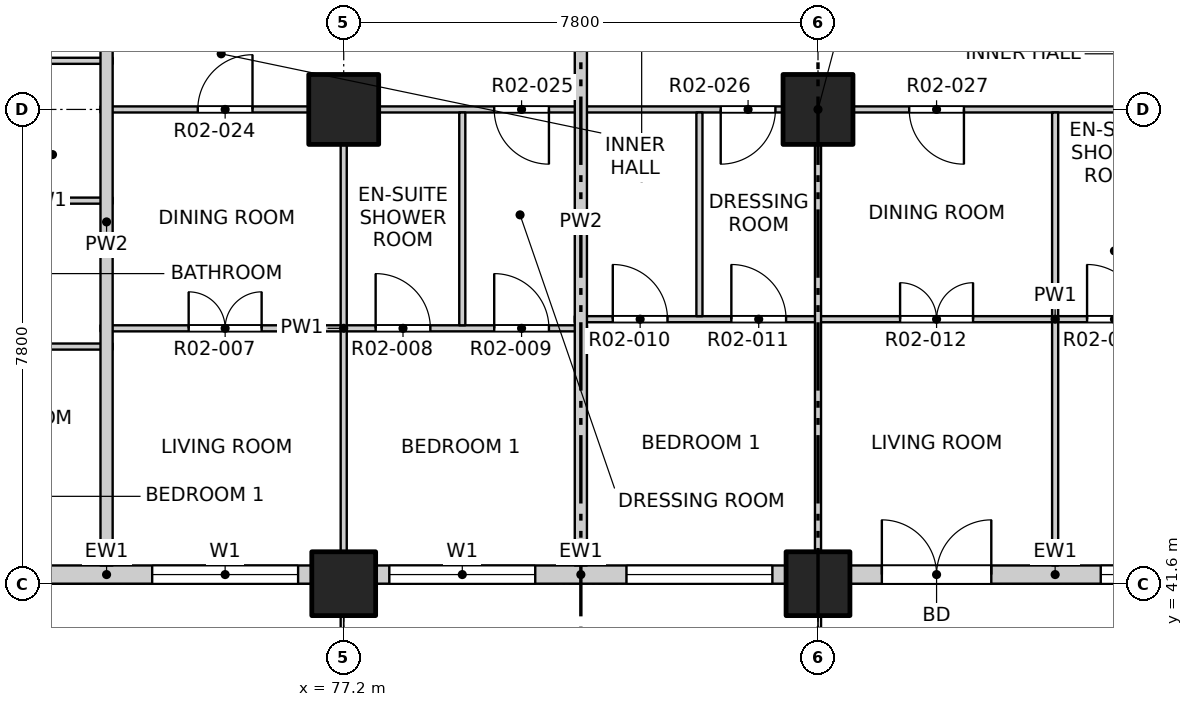
"""IFC4 building model, lengths in metres.
Left out: names, types, materials, properties, quantities, classifications, styles, units other than length and angle.
Written with IfcOpenShell. Run it as: python <this file> out.ifc"""

import sys

from ifc_helpers import new_model, si_unit, direction, frame, frame_2d, origin, origin_2d, place, context, subcontext, project, spatial, rectangle, extrude, element, fill, save


model = new_model("IFC4")
c1 = context("Model", 3, precision=1e-05, world=origin(), true_north=direction((0.0, 1.0)))
c2 = subcontext(c1, "Body", "Model", "MODEL_VIEW")
j1 = project(units=[si_unit("LENGTHUNIT", "METRE"), si_unit("PLANEANGLEUNIT", "RADIAN")], contexts=[c1])
p1 = place(None, origin())
s1 = spatial("IfcSite", under=j1, at=p1, CompositionType="ELEMENT")
p2 = place(p1, origin())
s2 = spatial("IfcBuilding", under=s1, at=p2, CompositionType="ELEMENT")
p3 = place(p2, frame((0.0, 0.0, 29.7)))
s3 = spatial("IfcBuildingStorey", under=s2, at=p3, CompositionType="ELEMENT", Elevation=29.7)
for number, where, z_axis, x_axis in (
    (1, (77.2, 41.6, -0.25), (0.0, 0.0, 1.0), (1.0, 0.0, 0.0)),
    (2, (85.0, 41.6, -0.25), (0.0, 0.0, 1.0), (1.0, 0.0, 0.0)),
):
    element("IfcColumn", number, at=place(p3, frame(where, z_axis=z_axis, x_axis=x_axis)), inside=s3, PredefinedType="COLUMN", context=c2, shape_type="SweptSolid", body=[
        extrude(rectangle(XDim=1.05, YDim=1.05, at=origin_2d()), origin(), (0.0, 0.0, 1.0), 3.4),
    ])
for number, where, z_axis, x_axis in (
    (3, (77.2, 49.4, -0.25), (0.0, 0.0, 1.0), (1.0, 0.0, 0.0)),
    (4, (85.0, 49.4, -0.25), (0.0, 0.0, 1.0), (1.0, 0.0, 0.0)),
):
    element("IfcColumn", number, at=place(p3, frame(where, z_axis=z_axis, x_axis=x_axis)), inside=s3, PredefinedType="COLUMN", context=c2, shape_type="SweptSolid", body=[
        extrude(rectangle(XDim=1.15, YDim=1.15, at=origin_2d()), origin(), (0.0, 0.0, 1.0), 3.4),
    ])
p4 = place(p3, frame((69.925, 41.75, 0.0), z_axis=(0.0, 0.0, 1.0), x_axis=(1.0, 0.0, 0.0)))
e5 = element("IfcWall", 5, at=p4, inside=s3, PredefinedType="SOLIDWALL", context=c2, shape_type="SweptSolid", body=[
    extrude(rectangle(XDim=6.75, YDim=0.3, at=frame_2d((3.375, 0.0))), origin(), (0.0, 0.0, 1.0), 2.7),
])
p5 = place(p4, frame((0.525, 0.0, 0.0)))
e6 = element("IfcOpeningElement", 6, at=p5, cuts=e5, PredefinedType="OPENING", context=c2, shape_type="SweptSolid", body=[
    extrude(rectangle(XDim=1.8, YDim=2.4, at=frame_2d((0.9, 1.2))), frame((0.0, 0.16, 0.0), z_axis=(0.0, -1.0, 0.0), x_axis=(1.0, 0.0, 0.0)), (0.0, 0.0, 1.0), 0.32),
])
p6 = place(p4, frame((4.125, 0.0, 0.9)))
e7 = element("IfcOpeningElement", 7, at=p6, cuts=e5, PredefinedType="OPENING", context=c2, shape_type="SweptSolid", body=[
    extrude(rectangle(XDim=2.4, YDim=1.8, at=frame_2d((1.2, 0.9))), frame((0.0, 0.16, 0.0), z_axis=(0.0, -1.0, 0.0), x_axis=(1.0, 0.0, 0.0)), (0.0, 0.0, 1.0), 0.32),
])
p7 = place(p3, frame((77.725, 41.75, 0.0), z_axis=(0.0, 0.0, 1.0), x_axis=(1.0, 0.0, 0.0)))
e8 = element("IfcWall", 8, at=p7, inside=s3, PredefinedType="SOLIDWALL", context=c2, shape_type="SweptSolid", body=[
    extrude(rectangle(XDim=6.75, YDim=0.3, at=frame_2d((3.375, 0.0))), origin(), (0.0, 0.0, 1.0), 2.7),
])
p8 = place(p7, frame((0.225, 0.0, 0.9)))
e9 = element("IfcOpeningElement", 9, at=p8, cuts=e8, PredefinedType="OPENING", context=c2, shape_type="SweptSolid", body=[
    extrude(rectangle(XDim=2.4, YDim=1.8, at=frame_2d((1.2, 0.9))), frame((0.0, 0.16, 0.0), z_axis=(0.0, -1.0, 0.0), x_axis=(1.0, 0.0, 0.0)), (0.0, 0.0, 1.0), 0.32),
])
p9 = place(p7, frame((4.125, 0.0, 0.9)))
e10 = element("IfcOpeningElement", 10, at=p9, cuts=e8, PredefinedType="OPENING", context=c2, shape_type="SweptSolid", body=[
    extrude(rectangle(XDim=2.4, YDim=1.8, at=frame_2d((1.2, 0.9))), frame((0.0, 0.16, 0.0), z_axis=(0.0, -1.0, 0.0), x_axis=(1.0, 0.0, 0.0)), (0.0, 0.0, 1.0), 0.32),
])
p10 = place(p3, frame((85.525, 41.75, 0.0), z_axis=(0.0, 0.0, 1.0), x_axis=(1.0, 0.0, 0.0)))
e11 = element("IfcWall", 11, at=p10, inside=s3, PredefinedType="SOLIDWALL", context=c2, shape_type="SweptSolid", body=[
    extrude(rectangle(XDim=6.75, YDim=0.3, at=frame_2d((3.375, 0.0))), origin(), (0.0, 0.0, 1.0), 2.7),
])
p11 = place(p10, frame((0.525, 0.0, 0.0)))
e12 = element("IfcOpeningElement", 12, at=p11, cuts=e11, PredefinedType="OPENING", context=c2, shape_type="SweptSolid", body=[
    extrude(rectangle(XDim=1.8, YDim=2.4, at=frame_2d((0.9, 1.2))), frame((0.0, 0.16, 0.0), z_axis=(0.0, -1.0, 0.0), x_axis=(1.0, 0.0, 0.0)), (0.0, 0.0, 1.0), 0.32),
])
p12 = place(p10, frame((4.125, 0.0, 0.9)))
e13 = element("IfcOpeningElement", 13, at=p12, cuts=e11, PredefinedType="OPENING", context=c2, shape_type="SweptSolid", body=[
    extrude(rectangle(XDim=2.4, YDim=1.8, at=frame_2d((1.2, 0.9))), frame((0.0, 0.16, 0.0), z_axis=(0.0, -1.0, 0.0), x_axis=(1.0, 0.0, 0.0)), (0.0, 0.0, 1.0), 0.32),
])
p13 = place(p3, frame((61.9, 45.5, 0.0), z_axis=(0.0, 0.0, 1.0), x_axis=(1.0, 0.0, 0.0)))
e14 = element("IfcWall", 14, at=p13, inside=s3, PredefinedType="PARTITIONING", context=c2, shape_type="SweptSolid", body=[
    extrude(rectangle(XDim=11.5, YDim=0.1, at=frame_2d((5.75, 0.0))), origin(), (0.0, 0.0, 1.0), 3.15),
])
p14 = place(p13, frame((7.965, 0.0, 0.0)))
e15 = element("IfcOpeningElement", 15, at=p14, cuts=e14, PredefinedType="OPENING", context=c2, shape_type="SweptSolid", body=[
    extrude(rectangle(XDim=0.9, YDim=2.1, at=frame_2d((0.45, 1.05))), frame((0.0, 0.06, 0.0), z_axis=(0.0, -1.0, 0.0), x_axis=(1.0, 0.0, 0.0)), (0.0, 0.0, 1.0), 0.12),
])
p15 = place(p3, frame((73.2, 45.8, 0.0), z_axis=(0.0, 0.0, 1.0), x_axis=(1.0, 0.0, 0.0)))
e16 = element("IfcWall", 16, at=p15, inside=s3, PredefinedType="PARTITIONING", context=c2, shape_type="SweptSolid", body=[
    extrude(rectangle(XDim=8.0, YDim=0.1, at=frame_2d((4.0, 0.0))), origin(), (0.0, 0.0, 1.0), 3.15),
])
p16 = place(p15, frame((1.45, 0.0, 0.0)))
e17 = element("IfcOpeningElement", 17, at=p16, cuts=e16, PredefinedType="OPENING", context=c2, shape_type="SweptSolid", body=[
    extrude(rectangle(XDim=1.2, YDim=2.1, at=frame_2d((0.6, 1.05))), frame((0.0, 0.06, 0.0), z_axis=(0.0, -1.0, 0.0), x_axis=(1.0, 0.0, 0.0)), (0.0, 0.0, 1.0), 0.12),
])
p17 = place(p15, frame((4.525, 0.0, 0.0)))
e18 = element("IfcOpeningElement", 18, at=p17, cuts=e16, PredefinedType="OPENING", context=c2, shape_type="SweptSolid", body=[
    extrude(rectangle(XDim=0.9, YDim=2.1, at=frame_2d((0.45, 1.05))), frame((0.0, 0.06, 0.0), z_axis=(0.0, -1.0, 0.0), x_axis=(1.0, 0.0, 0.0)), (0.0, 0.0, 1.0), 0.12),
])
p18 = place(p15, frame((6.475, 0.0, 0.0)))
e19 = element("IfcOpeningElement", 19, at=p18, cuts=e16, PredefinedType="OPENING", context=c2, shape_type="SweptSolid", body=[
    extrude(rectangle(XDim=0.9, YDim=2.1, at=frame_2d((0.45, 1.05))), frame((0.0, 0.06, 0.0), z_axis=(0.0, -1.0, 0.0), x_axis=(1.0, 0.0, 0.0)), (0.0, 0.0, 1.0), 0.12),
])
p19 = place(p3, frame((81.0, 45.95, 0.0), z_axis=(0.0, 0.0, 1.0), x_axis=(1.0, 0.0, 0.0)))
e20 = element("IfcWall", 20, at=p19, inside=s3, PredefinedType="PARTITIONING", context=c2, shape_type="SweptSolid", body=[
    extrude(rectangle(XDim=15.8, YDim=0.1, at=frame_2d((7.9, 0.0))), origin(), (0.0, 0.0, 1.0), 3.15),
])
p20 = place(p19, frame((0.625, 0.0, 0.0)))
e21 = element("IfcOpeningElement", 21, at=p20, cuts=e20, PredefinedType="OPENING", context=c2, shape_type="SweptSolid", body=[
    extrude(rectangle(XDim=0.9, YDim=2.1, at=frame_2d((0.45, 1.05))), frame((0.0, 0.06, 0.0), z_axis=(0.0, -1.0, 0.0), x_axis=(1.0, 0.0, 0.0)), (0.0, 0.0, 1.0), 0.12),
])
p21 = place(p19, frame((2.575, 0.0, 0.0)))
e22 = element("IfcOpeningElement", 22, at=p21, cuts=e20, PredefinedType="OPENING", context=c2, shape_type="SweptSolid", body=[
    extrude(rectangle(XDim=0.9, YDim=2.1, at=frame_2d((0.45, 1.05))), frame((0.0, 0.06, 0.0), z_axis=(0.0, -1.0, 0.0), x_axis=(1.0, 0.0, 0.0)), (0.0, 0.0, 1.0), 0.12),
])
p22 = place(p19, frame((5.35, 0.0, 0.0)))
e23 = element("IfcOpeningElement", 23, at=p22, cuts=e20, PredefinedType="OPENING", context=c2, shape_type="SweptSolid", body=[
    extrude(rectangle(XDim=1.2, YDim=2.1, at=frame_2d((0.6, 1.05))), frame((0.0, 0.06, 0.0), z_axis=(0.0, -1.0, 0.0), x_axis=(1.0, 0.0, 0.0)), (0.0, 0.0, 1.0), 0.12),
])
p23 = place(p19, frame((8.425, 0.0, 0.0)))
e24 = element("IfcOpeningElement", 24, at=p23, cuts=e20, PredefinedType="OPENING", context=c2, shape_type="SweptSolid", body=[
    extrude(rectangle(XDim=0.9, YDim=2.1, at=frame_2d((0.45, 1.05))), frame((0.0, 0.06, 0.0), z_axis=(0.0, -1.0, 0.0), x_axis=(1.0, 0.0, 0.0)), (0.0, 0.0, 1.0), 0.12),
])
p24 = place(p19, frame((10.375, 0.0, 0.0)))
e25 = element("IfcOpeningElement", 25, at=p24, cuts=e20, PredefinedType="OPENING", context=c2, shape_type="SweptSolid", body=[
    extrude(rectangle(XDim=0.9, YDim=2.1, at=frame_2d((0.45, 1.05))), frame((0.0, 0.06, 0.0), z_axis=(0.0, -1.0, 0.0), x_axis=(1.0, 0.0, 0.0)), (0.0, 0.0, 1.0), 0.12),
])
p25 = place(p19, frame((13.15, 0.0, 0.0)))
e26 = element("IfcOpeningElement", 26, at=p25, cuts=e20, PredefinedType="OPENING", context=c2, shape_type="SweptSolid", body=[
    extrude(rectangle(XDim=1.2, YDim=2.1, at=frame_2d((0.6, 1.05))), frame((0.0, 0.06, 0.0), z_axis=(0.0, -1.0, 0.0), x_axis=(1.0, 0.0, 0.0)), (0.0, 0.0, 1.0), 0.12),
])
p26 = place(p3, frame((71.18, 47.9, 0.0), z_axis=(0.0, 0.0, 1.0), x_axis=(1.0, 0.0, 0.0)))
e27 = element("IfcWall", 27, at=p26, inside=s3, PredefinedType="PARTITIONING", context=c2, shape_type="SweptSolid", body=[
    extrude(rectangle(XDim=2.22, YDim=0.1, at=frame_2d((1.11, 0.0))), origin(), (0.0, 0.0, 1.0), 3.15),
])
p27 = place(p3, frame((73.2, 49.4, 0.0), z_axis=(0.0, 0.0, 1.0), x_axis=(1.0, 0.0, 0.0)))
e28 = element("IfcWall", 28, at=p27, inside=s3, PredefinedType="PARTITIONING", context=c2, shape_type="SweptSolid", body=[
    extrude(rectangle(XDim=23.6, YDim=0.1, at=frame_2d((11.8, 0.0))), origin(), (0.0, 0.0, 1.0), 3.15),
])
p28 = place(p27, frame((1.6, 0.0, 0.0)))
e29 = element("IfcOpeningElement", 29, at=p28, cuts=e28, PredefinedType="OPENING", context=c2, shape_type="SweptSolid", body=[
    extrude(rectangle(XDim=0.9, YDim=2.1, at=frame_2d((0.45, 1.05))), frame((0.0, 0.06, 0.0), z_axis=(0.0, -1.0, 0.0), x_axis=(1.0, 0.0, 0.0)), (0.0, 0.0, 1.0), 0.12),
])
p29 = place(p27, frame((6.475, 0.0, 0.0)))
e30 = element("IfcOpeningElement", 30, at=p29, cuts=e28, PredefinedType="OPENING", context=c2, shape_type="SweptSolid", body=[
    extrude(rectangle(XDim=0.9, YDim=2.1, at=frame_2d((0.45, 1.05))), frame((0.0, 0.06, 0.0), z_axis=(0.0, -1.0, 0.0), x_axis=(1.0, 0.0, 0.0)), (0.0, 0.0, 1.0), 0.12),
])
p30 = place(p27, frame((10.2, 0.0, 0.0)))
e31 = element("IfcOpeningElement", 31, at=p30, cuts=e28, PredefinedType="OPENING", context=c2, shape_type="SweptSolid", body=[
    extrude(rectangle(XDim=0.9, YDim=2.1, at=frame_2d((0.45, 1.05))), frame((0.0, 0.06, 0.0), z_axis=(0.0, -1.0, 0.0), x_axis=(1.0, 0.0, 0.0)), (0.0, 0.0, 1.0), 0.12),
])
p31 = place(p27, frame((13.3, 0.0, 0.0)))
e32 = element("IfcOpeningElement", 32, at=p31, cuts=e28, PredefinedType="OPENING", context=c2, shape_type="SweptSolid", body=[
    extrude(rectangle(XDim=0.9, YDim=2.1, at=frame_2d((0.45, 1.05))), frame((0.0, 0.06, 0.0), z_axis=(0.0, -1.0, 0.0), x_axis=(1.0, 0.0, 0.0)), (0.0, 0.0, 1.0), 0.12),
])
p32 = place(p27, frame((18.0, 0.0, 0.0)))
e33 = element("IfcOpeningElement", 33, at=p32, cuts=e28, PredefinedType="OPENING", context=c2, shape_type="SweptSolid", body=[
    extrude(rectangle(XDim=0.9, YDim=2.1, at=frame_2d((0.45, 1.05))), frame((0.0, 0.06, 0.0), z_axis=(0.0, -1.0, 0.0), x_axis=(1.0, 0.0, 0.0)), (0.0, 0.0, 1.0), 0.12),
])
p33 = place(p27, frame((21.1, 0.0, 0.0)))
e34 = element("IfcOpeningElement", 34, at=p33, cuts=e28, PredefinedType="OPENING", context=c2, shape_type="SweptSolid", body=[
    extrude(rectangle(XDim=0.9, YDim=2.1, at=frame_2d((0.45, 1.05))), frame((0.0, 0.06, 0.0), z_axis=(0.0, -1.0, 0.0), x_axis=(1.0, 0.0, 0.0)), (0.0, 0.0, 1.0), 0.12),
])
p34 = place(p3, frame((71.18, 50.2, 0.0), z_axis=(0.0, 0.0, 1.0), x_axis=(1.0, 0.0, 0.0)))
e35 = element("IfcWall", 35, at=p34, inside=s3, PredefinedType="PARTITIONING", context=c2, shape_type="SweptSolid", body=[
    extrude(rectangle(XDim=2.22, YDim=0.1, at=frame_2d((1.11, 0.0))), origin(), (0.0, 0.0, 1.0), 3.15),
])
p35 = place(p3, frame((73.3, 41.9, 0.0), z_axis=(0.0, 0.0, 1.0), x_axis=(0.0, 1.0, 0.0)))
e36 = element("IfcWall", 36, at=p35, inside=s3, PredefinedType="PARTITIONING", context=c2, shape_type="SweptSolid", body=[
    extrude(rectangle(XDim=11.3, YDim=0.2, at=frame_2d((5.65, 0.0))), origin(), (0.0, 0.0, 1.0), 3.15),
])
p36 = place(p3, frame((77.2, 41.9, 0.0), z_axis=(0.0, 0.0, 1.0), x_axis=(0.0, 1.0, 0.0)))
e37 = element("IfcWall", 37, at=p36, inside=s3, PredefinedType="PARTITIONING", context=c2, shape_type="SweptSolid", body=[
    extrude(rectangle(XDim=7.45, YDim=0.1, at=frame_2d((3.725, 0.0))), origin(), (0.0, 0.0, 1.0), 2.55),
])
p37 = place(p3, frame((79.15, 45.85, 0.0), z_axis=(0.0, 0.0, 1.0), x_axis=(0.0, 1.0, 0.0)))
e38 = element("IfcWall", 38, at=p37, inside=s3, PredefinedType="PARTITIONING", context=c2, shape_type="SweptSolid", body=[
    extrude(rectangle(XDim=3.5, YDim=0.1, at=frame_2d((1.75, 0.0))), origin(), (0.0, 0.0, 1.0), 3.15),
])
p38 = place(p3, frame((81.1, 41.9, 0.0), z_axis=(0.0, 0.0, 1.0), x_axis=(0.0, 1.0, 0.0)))
e39 = element("IfcWall", 39, at=p38, inside=s3, PredefinedType="PARTITIONING", context=c2, shape_type="SweptSolid", body=[
    extrude(rectangle(XDim=11.3, YDim=0.2, at=frame_2d((5.65, 0.0))), origin(), (0.0, 0.0, 1.0), 3.15),
])
p39 = place(p3, frame((83.05, 46.0, 0.0), z_axis=(0.0, 0.0, 1.0), x_axis=(0.0, 1.0, 0.0)))
e40 = element("IfcWall", 40, at=p39, inside=s3, PredefinedType="PARTITIONING", context=c2, shape_type="SweptSolid", body=[
    extrude(rectangle(XDim=3.35, YDim=0.1, at=frame_2d((1.675, 0.0))), origin(), (0.0, 0.0, 1.0), 3.15),
])
p40 = place(p3, frame((85.0, 41.9, 0.0), z_axis=(0.0, 0.0, 1.0), x_axis=(0.0, 1.0, 0.0)))
e41 = element("IfcWall", 41, at=p40, inside=s3, PredefinedType="PARTITIONING", context=c2, shape_type="SweptSolid", body=[
    extrude(rectangle(XDim=7.45, YDim=0.1, at=frame_2d((3.725, 0.0))), origin(), (0.0, 0.0, 1.0), 2.55),
])
p41 = place(p3, frame((88.9, 41.9, 0.0), z_axis=(0.0, 0.0, 1.0), x_axis=(0.0, 1.0, 0.0)))
e42 = element("IfcWall", 42, at=p41, inside=s3, PredefinedType="PARTITIONING", context=c2, shape_type="SweptSolid", body=[
    extrude(rectangle(XDim=7.45, YDim=0.1, at=frame_2d((3.725, 0.0))), origin(), (0.0, 0.0, 1.0), 3.15),
])
p42 = place(p6, origin())
e43 = element("IfcWindow", 43, at=p42, inside=s3, PartitioningType="DOUBLE_PANEL_VERTICAL", PredefinedType="WINDOW", context=c2, shape_type="SweptSolid", body=[
    extrude(rectangle(XDim=2.4, YDim=1.8, at=frame_2d((1.2, 0.9))), frame((0.0, 0.03, 0.0), z_axis=(0.0, -1.0, 0.0), x_axis=(1.0, 0.0, 0.0)), (0.0, 0.0, 1.0), 0.06),
])
fill(e7, e43)
p43 = place(p8, origin())
e44 = element("IfcWindow", 44, at=p43, inside=s3, PartitioningType="DOUBLE_PANEL_VERTICAL", PredefinedType="WINDOW", context=c2, shape_type="SweptSolid", body=[
    extrude(rectangle(XDim=2.4, YDim=1.8, at=frame_2d((1.2, 0.9))), frame((0.0, 0.03, 0.0), z_axis=(0.0, -1.0, 0.0), x_axis=(1.0, 0.0, 0.0)), (0.0, 0.0, 1.0), 0.06),
])
fill(e9, e44)
p44 = place(p9, origin())
e45 = element("IfcWindow", 45, at=p44, inside=s3, PartitioningType="DOUBLE_PANEL_VERTICAL", PredefinedType="WINDOW", context=c2, shape_type="SweptSolid", body=[
    extrude(rectangle(XDim=2.4, YDim=1.8, at=frame_2d((1.2, 0.9))), frame((0.0, 0.03, 0.0), z_axis=(0.0, -1.0, 0.0), x_axis=(1.0, 0.0, 0.0)), (0.0, 0.0, 1.0), 0.06),
])
fill(e10, e45)
p45 = place(p11, origin())
e46 = element("IfcDoor", 46, at=p45, inside=s3, OperationType="DOUBLE_DOOR_SINGLE_SWING", PredefinedType="DOOR", context=c2, shape_type="SweptSolid", body=[
    extrude(rectangle(XDim=1.8, YDim=2.4, at=frame_2d((0.9, 1.2))), frame((0.0, 0.025, 0.0), z_axis=(0.0, -1.0, 0.0), x_axis=(1.0, 0.0, 0.0)), (0.0, 0.0, 1.0), 0.05),
])
fill(e12, e46)
p46 = place(p12, origin())
e47 = element("IfcWindow", 47, at=p46, inside=s3, PartitioningType="DOUBLE_PANEL_VERTICAL", PredefinedType="WINDOW", context=c2, shape_type="SweptSolid", body=[
    extrude(rectangle(XDim=2.4, YDim=1.8, at=frame_2d((1.2, 0.9))), frame((0.0, 0.03, 0.0), z_axis=(0.0, -1.0, 0.0), x_axis=(1.0, 0.0, 0.0)), (0.0, 0.0, 1.0), 0.06),
])
fill(e13, e47)
p47 = place(p16, origin())
e48 = element("IfcDoor", 48, at=p47, inside=s3, OperationType="DOUBLE_DOOR_SINGLE_SWING", PredefinedType="DOOR", context=c2, shape_type="SweptSolid", body=[
    extrude(rectangle(XDim=1.2, YDim=2.1, at=frame_2d((0.6, 1.05))), frame((0.0, 0.025, 0.0), z_axis=(0.0, -1.0, 0.0), x_axis=(1.0, 0.0, 0.0)), (0.0, 0.0, 1.0), 0.05),
])
fill(e17, e48)
p48 = place(p17, origin())
e49 = element("IfcDoor", 49, at=p48, inside=s3, OperationType="SINGLE_SWING_LEFT", PredefinedType="DOOR", context=c2, shape_type="SweptSolid", body=[
    extrude(rectangle(XDim=0.9, YDim=2.1, at=frame_2d((0.45, 1.05))), frame((0.0, 0.025, 0.0), z_axis=(0.0, -1.0, 0.0), x_axis=(1.0, 0.0, 0.0)), (0.0, 0.0, 1.0), 0.05),
])
fill(e18, e49)
p49 = place(p18, origin())
e50 = element("IfcDoor", 50, at=p49, inside=s3, OperationType="SINGLE_SWING_LEFT", PredefinedType="DOOR", context=c2, shape_type="SweptSolid", body=[
    extrude(rectangle(XDim=0.9, YDim=2.1, at=frame_2d((0.45, 1.05))), frame((0.0, 0.025, 0.0), z_axis=(0.0, -1.0, 0.0), x_axis=(1.0, 0.0, 0.0)), (0.0, 0.0, 1.0), 0.05),
])
fill(e19, e50)
p50 = place(p20, origin())
e51 = element("IfcDoor", 51, at=p50, inside=s3, OperationType="SINGLE_SWING_LEFT", PredefinedType="DOOR", context=c2, shape_type="SweptSolid", body=[
    extrude(rectangle(XDim=0.9, YDim=2.1, at=frame_2d((0.45, 1.05))), frame((0.0, 0.025, 0.0), z_axis=(0.0, -1.0, 0.0), x_axis=(1.0, 0.0, 0.0)), (0.0, 0.0, 1.0), 0.05),
])
fill(e21, e51)
p51 = place(p21, origin())
e52 = element("IfcDoor", 52, at=p51, inside=s3, OperationType="SINGLE_SWING_LEFT", PredefinedType="DOOR", context=c2, shape_type="SweptSolid", body=[
    extrude(rectangle(XDim=0.9, YDim=2.1, at=frame_2d((0.45, 1.05))), frame((0.0, 0.025, 0.0), z_axis=(0.0, -1.0, 0.0), x_axis=(1.0, 0.0, 0.0)), (0.0, 0.0, 1.0), 0.05),
])
fill(e22, e52)
p52 = place(p22, origin())
e53 = element("IfcDoor", 53, at=p52, inside=s3, OperationType="DOUBLE_DOOR_SINGLE_SWING", PredefinedType="DOOR", context=c2, shape_type="SweptSolid", body=[
    extrude(rectangle(XDim=1.2, YDim=2.1, at=frame_2d((0.6, 1.05))), frame((0.0, 0.025, 0.0), z_axis=(0.0, -1.0, 0.0), x_axis=(1.0, 0.0, 0.0)), (0.0, 0.0, 1.0), 0.05),
])
fill(e23, e53)
p53 = place(p23, origin())
e54 = element("IfcDoor", 54, at=p53, inside=s3, OperationType="SINGLE_SWING_LEFT", PredefinedType="DOOR", context=c2, shape_type="SweptSolid", body=[
    extrude(rectangle(XDim=0.9, YDim=2.1, at=frame_2d((0.45, 1.05))), frame((0.0, 0.025, 0.0), z_axis=(0.0, -1.0, 0.0), x_axis=(1.0, 0.0, 0.0)), (0.0, 0.0, 1.0), 0.05),
])
fill(e24, e54)
p54 = place(p28, origin())
e55 = element("IfcDoor", 55, at=p54, inside=s3, OperationType="SINGLE_SWING_RIGHT", PredefinedType="DOOR", context=c2, shape_type="SweptSolid", body=[
    extrude(rectangle(XDim=0.9, YDim=2.1, at=frame_2d((0.45, 1.05))), frame((0.0, 0.025, 0.0), z_axis=(0.0, -1.0, 0.0), x_axis=(1.0, 0.0, 0.0)), (0.0, 0.0, 1.0), 0.05),
])
fill(e29, e55)
p55 = place(p29, origin())
e56 = element("IfcDoor", 56, at=p55, inside=s3, OperationType="SINGLE_SWING_LEFT", PredefinedType="DOOR", context=c2, shape_type="SweptSolid", body=[
    extrude(rectangle(XDim=0.9, YDim=2.1, at=frame_2d((0.45, 1.05))), frame((0.0, 0.025, 0.0), z_axis=(0.0, -1.0, 0.0), x_axis=(1.0, 0.0, 0.0)), (0.0, 0.0, 1.0), 0.05),
])
fill(e30, e56)
p56 = place(p30, origin())
e57 = element("IfcDoor", 57, at=p56, inside=s3, OperationType="SINGLE_SWING_RIGHT", PredefinedType="DOOR", context=c2, shape_type="SweptSolid", body=[
    extrude(rectangle(XDim=0.9, YDim=2.1, at=frame_2d((0.45, 1.05))), frame((0.0, 0.025, 0.0), z_axis=(0.0, -1.0, 0.0), x_axis=(1.0, 0.0, 0.0)), (0.0, 0.0, 1.0), 0.05),
])
fill(e31, e57)
p57 = place(p31, origin())
e58 = element("IfcDoor", 58, at=p57, inside=s3, OperationType="SINGLE_SWING_LEFT", PredefinedType="DOOR", context=c2, shape_type="SweptSolid", body=[
    extrude(rectangle(XDim=0.9, YDim=2.1, at=frame_2d((0.45, 1.05))), frame((0.0, 0.025, 0.0), z_axis=(0.0, -1.0, 0.0), x_axis=(1.0, 0.0, 0.0)), (0.0, 0.0, 1.0), 0.05),
])
fill(e32, e58)
save(model, sys.argv[1])
